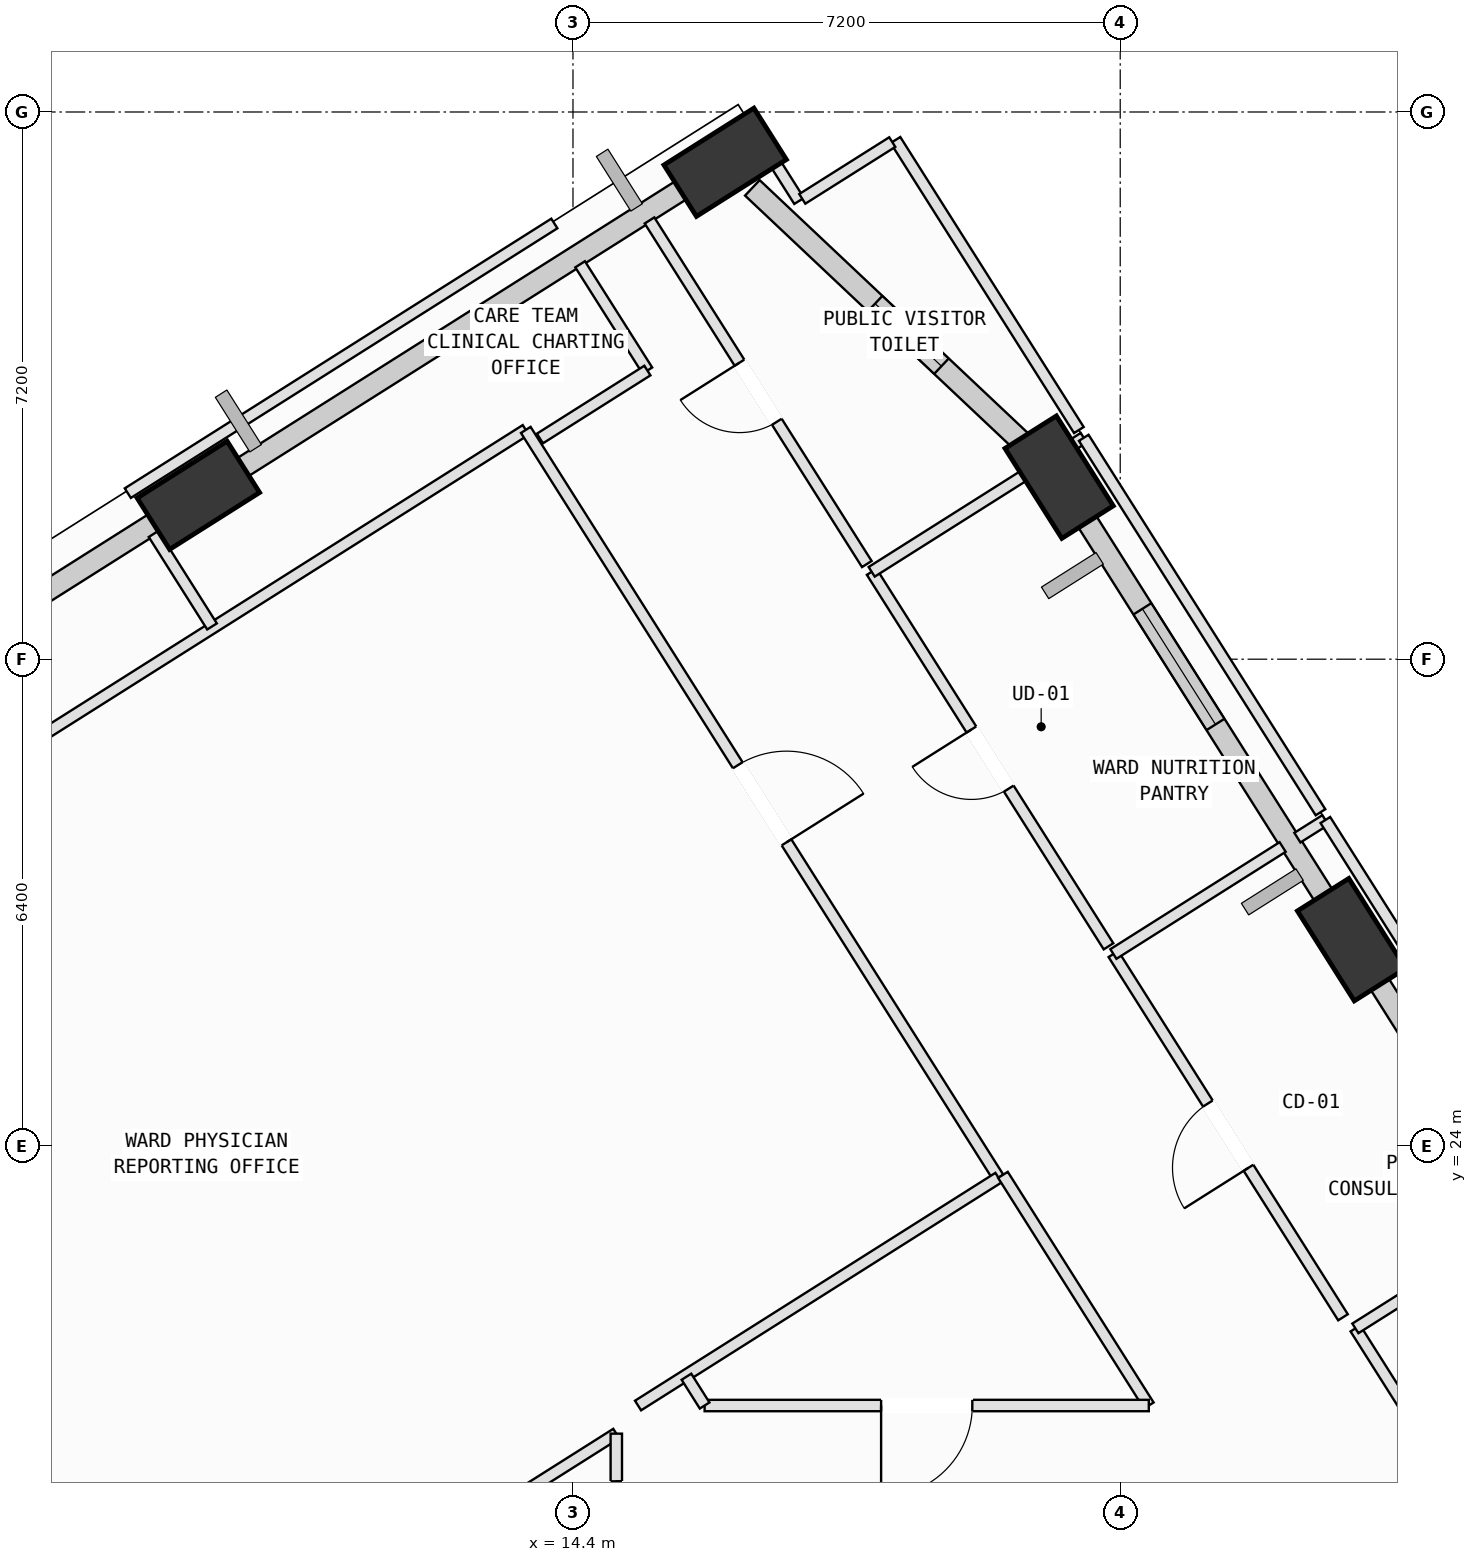
"""IFC4 building model, lengths in metres.
Left out: names, types, materials, properties, quantities, classifications, styles, units other than length and angle.
Written with IfcOpenShell. Run it as: python <this file> out.ifc"""

import sys

from ifc_helpers import new_model, si_unit, direction, frame, frame_2d, origin, origin_2d, place, context, subcontext, project, spatial, rectangle, extrude, element, fill, save


model = new_model("IFC4")
c1 = context("Model", 3, precision=1e-05, world=origin(), true_north=direction((0.0, 1.0)))
c2 = subcontext(c1, "Body", "Model", "MODEL_VIEW")
j1 = project(units=[si_unit("LENGTHUNIT", "METRE"), si_unit("PLANEANGLEUNIT", "RADIAN")], contexts=[c1])
p1 = place(None, origin())
s1 = spatial("IfcSite", under=j1, at=p1, CompositionType="ELEMENT")
p2 = place(p1, origin())
s2 = spatial("IfcBuilding", under=s1, at=p2, CompositionType="ELEMENT")
p3 = place(p2, frame((0.0, 0.0, 161.8)))
s3 = spatial("IfcBuildingStorey", under=s2, at=p3, CompositionType="ELEMENT", Elevation=161.8)
p4 = place(p3, frame((24.644, 26.71, 0.002), z_axis=(-0.007569840548, -0.037177684627, 0.99927999944), x_axis=(-0.355084598959, 0.934283931075, 0.032069669727)))
e1 = element("IfcColumn", 1, at=p4, inside=s3, PredefinedType="COLUMN", context=c2, shape_type="SweptSolid", body=[
    extrude(rectangle(XDim=1.4, YDim=0.8, at=origin_2d()), origin(), (0.0, 0.0, 1.0), 3.999),
])
p5 = place(p3, frame((20.796, 32.795, 0.002), z_axis=(-0.032680886403, -0.053228384011, 0.998047443161), x_axis=(-0.013972747304, 0.998507590936, 0.05279538972)))
e2 = element("IfcColumn", 2, at=p5, inside=s3, PredefinedType="COLUMN", context=c2, shape_type="SweptSolid", body=[
    extrude(rectangle(XDim=1.4, YDim=0.8, at=origin_2d()), origin(), (0.0, 0.0, 1.0), 4.004),
])
p6 = place(p3, frame((16.402, 36.939, 0.002), z_axis=(-0.049539835521, -0.071449345089, 0.996213228071), x_axis=(0.997943557889, -0.044161717518, 0.046458561901)))
e3 = element("IfcColumn", 3, at=p6, inside=s3, PredefinedType="COLUMN", context=c2, shape_type="SweptSolid", body=[
    extrude(rectangle(XDim=1.4, YDim=0.8, at=origin_2d()), origin(), (0.0, 0.0, 1.0), 4.011),
])
p7 = place(p3, frame((9.471, 32.557, 0.002), z_axis=(-0.03110757171, -0.099702197609, 0.994530940079), x_axis=(0.965182566959, 0.255554230871, 0.055809027255)))
e4 = element("IfcColumn", 4, at=p7, inside=s3, PredefinedType="COLUMN", context=c2, shape_type="SweptSolid", body=[
    extrude(rectangle(XDim=1.4, YDim=0.8, at=origin_2d()), origin(), (0.0, 0.0, 1.0), 4.018),
])
p8 = place(p3, frame((28.549, 20.532, 0.0), z_axis=(0.0, 0.0, 1.0), x_axis=(-0.534367970057, 0.845251958044, 0.0)))
e5 = element("IfcWall", 5, at=p8, inside=s3, PredefinedType="SOLIDWALL", context=c2, shape_type="SweptSolid", body=[
    extrude(rectangle(XDim=6.76, YDim=0.28, at=frame_2d((3.38, 0.0))), origin(), (0.0, 0.0, 1.0), 3.165),
])
p9 = place(p3, frame((24.409, 27.081, 0.0), z_axis=(0.0, 0.0, 1.0), x_axis=(-0.534364923139, 0.845253884296, 0.0)))
e6 = element("IfcWall", 6, at=p9, inside=s3, PredefinedType="SOLIDWALL", context=c2, shape_type="SweptSolid", body=[
    extrude(rectangle(XDim=6.223, YDim=0.28, at=frame_2d((3.111, 0.0))), origin(), (0.0, 0.0, 1.0), 3.165),
])
p10 = place(p9, frame((2.911, 0.0, 0.75)))
e7 = element("IfcOpeningElement", 7, at=p10, cuts=e6, PredefinedType="OPENING", context=c2, shape_type="SweptSolid", body=[
    extrude(rectangle(XDim=1.8, YDim=2.05, at=frame_2d((0.9, 1.025))), frame((0.0, 0.15, 0.0), z_axis=(0.0, -1.0, 0.0), x_axis=(1.0, 0.0, 0.0)), (0.0, 0.0, 1.0), 0.3),
])
p11 = place(p3, frame((16.76, 36.602, 0.0), z_axis=(0.0, 0.0, 1.0), x_axis=(0.727536761249, -0.686068699936, 0.0)))
e8 = element("IfcWall", 8, at=p11, inside=s3, PredefinedType="SOLIDWALL", context=c2, shape_type="SweptSolid", body=[
    extrude(rectangle(XDim=5.093, YDim=0.28, at=frame_2d((2.546, 0.0))), origin(), (0.0, 0.0, 1.0), 3.165),
])
p12 = place(p11, frame((2.22, 0.0, 0.75)))
e9 = element("IfcOpeningElement", 9, at=p12, cuts=e8, PredefinedType="OPENING", context=c2, shape_type="SweptSolid", body=[
    extrude(rectangle(XDim=1.2, YDim=1.75, at=frame_2d((0.6, 0.875))), frame((0.0, 0.15, 0.0), z_axis=(0.0, -1.0, 0.0), x_axis=(1.0, 0.0, 0.0)), (0.0, 0.0, 1.0), 0.3),
])
p13 = place(p3, frame((9.74, 32.727, 0.0), z_axis=(0.0, 0.0, 1.0), x_axis=(0.845259360398, 0.534356260991, 0.0)))
e10 = element("IfcWall", 10, at=p13, inside=s3, PredefinedType="SOLIDWALL", context=c2, shape_type="SweptSolid", body=[
    extrude(rectangle(XDim=7.231, YDim=0.28, at=frame_2d((3.615, 0.0))), origin(), (0.0, 0.0, 1.0), 3.165),
])
p14 = place(p3, frame((2.788, 28.332, 0.0), z_axis=(0.0, 0.0, 1.0), x_axis=(0.845259004131, 0.534356824543, 0.0)))
e11 = element("IfcWall", 11, at=p14, inside=s3, PredefinedType="SOLIDWALL", context=c2, shape_type="SweptSolid", body=[
    extrude(rectangle(XDim=7.27, YDim=0.28, at=frame_2d((3.635, 0.0))), origin(), (0.0, 0.0, 1.0), 3.165),
])
p15 = place(p3, frame((7.249, 15.328, 0.0), z_axis=(0.0, 0.0, 1.0), x_axis=(0.845207448996, 0.534438367038, 0.0)))
e12 = element("IfcWall", 12, at=p15, inside=s3, PredefinedType="PARTITIONING", context=c2, shape_type="SweptSolid", body=[
    extrude(rectangle(XDim=9.135, YDim=0.15, at=frame_2d((4.567, 0.0))), origin(), (0.0, 0.0, 1.0), 3.78),
])
p16 = place(p3, frame((14.97, 20.21, 0.0), z_axis=(0.0, 0.0, 1.0), x_axis=(0.0, -1.0, 0.0)))
e13 = element("IfcWall", 13, at=p16, inside=s3, PredefinedType="PARTITIONING", context=c2, shape_type="SweptSolid", body=[
    extrude(rectangle(XDim=1.98, YDim=0.15, at=frame_2d((0.99, 0.0))), origin(), (0.0, 0.0, 1.0), 3.78),
])
p17 = place(p16, frame((0.627, 0.0, 0.0)))
e14 = element("IfcOpeningElement", 14, at=p17, cuts=e13, PredefinedType="OPENING", context=c2, shape_type="SweptSolid", body=[
    extrude(rectangle(XDim=0.86, YDim=2.06, at=frame_2d((0.43, 1.03))), frame((0.0, 0.085, 0.0), z_axis=(0.0, -1.0, 0.0), x_axis=(1.0, 0.0, 0.0)), (0.0, 0.0, 1.0), 0.17),
])
p18 = place(p3, frame((2.561, 26.326, 0.0), z_axis=(0.0, 0.0, 1.0), x_axis=(0.845284698624, 0.534316178187, 0.0)))
e15 = element("IfcWall", 15, at=p18, inside=s3, PredefinedType="PARTITIONING", context=c2, shape_type="SweptSolid", body=[
    extrude(rectangle(XDim=13.271, YDim=0.15, at=frame_2d((6.636, 0.0))), origin(), (0.0, 0.0, 1.0), 3.78),
])
p19 = place(p3, frame((13.779, 33.417, 0.0), z_axis=(0.0, 0.0, 1.0), x_axis=(0.534288889049, -0.84530194785, 0.0)))
e16 = element("IfcWall", 16, at=p19, inside=s3, PredefinedType="PARTITIONING", context=c2, shape_type="SweptSolid", body=[
    extrude(rectangle(XDim=11.64, YDim=0.15, at=frame_2d((5.82, 0.0))), origin(), (0.0, 0.0, 1.0), 3.78),
])
p20 = place(p19, frame((5.22, 0.0, 0.0)))
e17 = element("IfcOpeningElement", 17, at=p20, cuts=e16, PredefinedType="OPENING", context=c2, shape_type="SweptSolid", body=[
    extrude(rectangle(XDim=1.2, YDim=2.15, at=frame_2d((0.6, 1.075))), frame((0.0, 0.085, 0.0), z_axis=(0.0, -1.0, 0.0), x_axis=(1.0, 0.0, 0.0)), (0.0, 0.0, 1.0), 0.17),
])
p21 = place(p3, frame((19.998, 23.578, 0.0), z_axis=(0.0, 0.0, 1.0), x_axis=(-0.845256150615, -0.534361338279, 0.0)))
e18 = element("IfcWall", 18, at=p21, inside=s3, PredefinedType="PARTITIONING", context=c2, shape_type="SweptSolid", body=[
    extrude(rectangle(XDim=5.61, YDim=0.15, at=frame_2d((2.805, 0.0))), origin(), (0.0, 0.0, 1.0), 3.78),
])
p22 = place(p3, frame((25.336, 20.58, 0.0), z_axis=(0.0, 0.0, 1.0), x_axis=(-0.53450539879, 0.845165060012, 0.0)))
e19 = element("IfcWall", 19, at=p22, inside=s3, PredefinedType="PARTITIONING", context=c2, shape_type="SweptSolid", body=[
    extrude(rectangle(XDim=1.201, YDim=0.15, at=frame_2d((0.601, 0.0))), origin(), (0.0, 0.0, 1.0), 3.415),
])
p23 = place(p3, frame((24.694, 21.595, 0.0), z_axis=(0.0, 0.0, 1.0), x_axis=(0.845308645917, 0.534278291846, 0.0)))
e20 = element("IfcWall", 20, at=p23, inside=s3, PredefinedType="PARTITIONING", context=c2, shape_type="SweptSolid", body=[
    extrude(rectangle(XDim=2.575, YDim=0.15, at=frame_2d((1.288, 0.0))), origin(), (0.0, 0.0, 1.0), 3.78),
])
p24 = place(p3, frame((24.531, 21.741, 0.0), z_axis=(0.0, 0.0, 1.0), x_axis=(-0.534249623968, 0.845326764802, 0.0)))
e21 = element("IfcWall", 21, at=p24, inside=s3, PredefinedType="PARTITIONING", context=c2, shape_type="SweptSolid", body=[
    extrude(rectangle(XDim=5.655, YDim=0.15, at=frame_2d((2.827, 0.0))), origin(), (0.0, 0.0, 1.0), 3.78),
])
p25 = place(p24, frame((2.327, 0.0, 0.0)))
e22 = element("IfcOpeningElement", 22, at=p25, cuts=e21, PredefinedType="OPENING", context=c2, shape_type="SweptSolid", body=[
    extrude(rectangle(XDim=1.0, YDim=2.12, at=frame_2d((0.5, 1.06))), frame((0.0, 0.085, 0.0), z_axis=(0.0, -1.0, 0.0), x_axis=(1.0, 0.0, 0.0)), (0.0, 0.0, 1.0), 0.17),
])
p26 = place(p3, frame((21.51, 26.521, 0.0), z_axis=(0.0, 0.0, 1.0), x_axis=(0.845248817842, 0.53437293713, 0.0)))
e23 = element("IfcWall", 23, at=p26, inside=s3, PredefinedType="PARTITIONING", context=c2, shape_type="SweptSolid", body=[
    extrude(rectangle(XDim=2.635, YDim=0.15, at=frame_2d((1.317, 0.0))), origin(), (0.0, 0.0, 1.0), 3.78),
])
p27 = place(p3, frame((23.931, 28.052, 0.0), z_axis=(0.0, 0.0, 1.0), x_axis=(0.846101639655, 0.533021589969, 0.0)))
e24 = element("IfcWall", 24, at=p27, inside=s3, PredefinedType="PARTITIONING", context=c2, shape_type="SweptSolid", body=[
    extrude(rectangle(XDim=0.435, YDim=0.15, at=frame_2d((0.218, 0.0))), origin(), (0.0, 0.0, 1.0), 3.78),
])
p28 = place(p3, frame((24.299, 28.284, 0.0), z_axis=(0.0, 0.0, 1.0), x_axis=(0.534373014898, -0.845248768677, 0.0)))
e25 = element("IfcWall", 25, at=p28, inside=s3, PredefinedType="PARTITIONING", context=c2, shape_type="SweptSolid", body=[
    extrude(rectangle(XDim=5.655, YDim=0.15, at=frame_2d((2.828, 0.0))), origin(), (0.0, 0.0, 1.0), 3.78),
])
p29 = place(p3, frame((21.446, 26.622, 0.0), z_axis=(0.0, 0.0, 1.0), x_axis=(-0.534429314986, 0.845213172687, 0.0)))
e26 = element("IfcWall", 26, at=p29, inside=s3, PredefinedType="PARTITIONING", context=c2, shape_type="SweptSolid", body=[
    extrude(rectangle(XDim=5.831, YDim=0.15, at=frame_2d((2.915, 0.0))), origin(), (0.0, 0.0, 1.0), 3.78),
])
p30 = place(p29, frame((2.455, 0.0, 0.0)))
e27 = element("IfcOpeningElement", 27, at=p30, cuts=e26, PredefinedType="OPENING", context=c2, shape_type="SweptSolid", body=[
    extrude(rectangle(XDim=0.92, YDim=2.1, at=frame_2d((0.46, 1.05))), frame((0.0, 0.085, 0.0), z_axis=(0.0, -1.0, 0.0), x_axis=(1.0, 0.0, 0.0)), (0.0, 0.0, 1.0), 0.17),
])
p31 = place(p3, frame((18.33, 31.55, 0.0), z_axis=(0.0, 0.0, 1.0), x_axis=(0.845378143146, 0.534168320936, 0.0)))
e28 = element("IfcWall", 28, at=p31, inside=s3, PredefinedType="PARTITIONING", context=c2, shape_type="SweptSolid", body=[
    extrude(rectangle(XDim=3.3, YDim=0.15, at=frame_2d((1.65, 0.0))), origin(), (0.0, 0.0, 1.0), 3.78),
])
p32 = place(p3, frame((21.12, 33.313, 0.0), z_axis=(0.0, 0.0, 1.0), x_axis=(0.53438530718, -0.845240997272, 0.0)))
e29 = element("IfcWall", 29, at=p32, inside=s3, PredefinedType="PARTITIONING", context=c2, shape_type="SweptSolid", body=[
    extrude(rectangle(XDim=5.829, YDim=0.15, at=frame_2d((2.915, 0.0))), origin(), (0.0, 0.0, 1.0), 3.78),
])
p33 = place(p3, frame((18.643, 37.231, 0.0), z_axis=(0.0, 0.0, 1.0), x_axis=(0.534434415404, -0.845209947665, 0.0)))
e30 = element("IfcWall", 30, at=p33, inside=s3, PredefinedType="PARTITIONING", context=c2, shape_type="SweptSolid", body=[
    extrude(rectangle(XDim=4.515, YDim=0.15, at=frame_2d((2.257, 0.0))), origin(), (0.0, 0.0, 1.0), 3.78),
])
p34 = place(p3, frame((18.266, 31.652, 0.0), z_axis=(0.0, 0.0, 1.0), x_axis=(-0.534496026991, 0.84517098692, 0.0)))
e31 = element("IfcWall", 31, at=p34, inside=s3, PredefinedType="PARTITIONING", context=c2, shape_type="SweptSolid", body=[
    extrude(rectangle(XDim=5.349, YDim=0.15, at=frame_2d((2.675, 0.0))), origin(), (0.0, 0.0, 1.0), 3.78),
])
p35 = place(p34, frame((2.215, 0.0, 0.0)))
e32 = element("IfcOpeningElement", 32, at=p35, cuts=e31, PredefinedType="OPENING", context=c2, shape_type="SweptSolid", body=[
    extrude(rectangle(XDim=0.92, YDim=2.1, at=frame_2d((0.46, 1.05))), frame((0.0, 0.085, 0.0), z_axis=(0.0, -1.0, 0.0), x_axis=(1.0, 0.0, 0.0)), (0.0, 0.0, 1.0), 0.17),
])
p36 = place(p3, frame((15.75, 36.751, 0.0), z_axis=(0.0, 0.0, 1.0), x_axis=(0.845363390997, 0.534191667065, 0.0)))
e33 = element("IfcWall", 33, at=p36, inside=s3, PredefinedType="PARTITIONING", context=c2, shape_type="SweptSolid", body=[
    extrude(rectangle(XDim=1.202, YDim=0.15, at=frame_2d((0.601, 0.0))), origin(), (0.0, 0.0, 1.0), 3.165),
])
p37 = place(p3, frame((16.793, 37.351, 0.0), z_axis=(0.0, 0.0, 1.0), x_axis=(0.534161581177, -0.845382401754, 0.0)))
e34 = element("IfcWall", 34, at=p37, inside=s3, PredefinedType="PARTITIONING", context=c2, shape_type="SweptSolid", body=[
    extrude(rectangle(XDim=1.09, YDim=0.15, at=frame_2d((0.545, 0.0))), origin(), (0.0, 0.0, 1.0), 3.78),
])
p38 = place(p3, frame((17.417, 36.457, 0.0), z_axis=(0.0, 0.0, 1.0), x_axis=(0.845737430746, 0.533599286202, 0.0)))
e35 = element("IfcWall", 35, at=p38, inside=s3, PredefinedType="PARTITIONING", context=c2, shape_type="SweptSolid", body=[
    extrude(rectangle(XDim=1.4, YDim=0.15, at=frame_2d((0.7, 0.0))), origin(), (0.0, 0.0, 1.0), 3.78),
])
p39 = place(p3, frame((20.057, 23.615, 0.0), z_axis=(0.0, 0.0, 1.0), x_axis=(0.534471261003, -0.845186648712, 0.0)))
e36 = element("IfcWall", 36, at=p39, inside=s3, PredefinedType="PARTITIONING", context=c2, shape_type="SweptSolid", body=[
    extrude(rectangle(XDim=3.591, YDim=0.15, at=frame_2d((1.795, 0.0))), origin(), (0.0, 0.0, 1.0), 3.78),
])
p40 = place(p3, frame((21.976, 20.58, 0.0), z_axis=(0.0, 0.0, 1.0), x_axis=(-1.0, 0.0, 0.0)))
e37 = element("IfcWall", 37, at=p40, inside=s3, PredefinedType="PARTITIONING", context=c2, shape_type="SweptSolid", body=[
    extrude(rectangle(XDim=5.844, YDim=0.15, at=frame_2d((2.922, 0.0))), origin(), (0.0, 0.0, 1.0), 3.78),
])
p41 = place(p40, frame((2.322, 0.0, 0.0)))
e38 = element("IfcOpeningElement", 38, at=p41, cuts=e37, PredefinedType="OPENING", context=c2, shape_type="SweptSolid", body=[
    extrude(rectangle(XDim=1.2, YDim=2.15, at=frame_2d((0.6, 1.075))), frame((0.0, 0.085, 0.0), z_axis=(0.0, -1.0, 0.0), x_axis=(1.0, 0.0, 0.0)), (0.0, 0.0, 1.0), 0.17),
])
p42 = place(p3, frame((16.132, 20.58, 0.0), z_axis=(0.0, 0.0, 1.0), x_axis=(-0.53352132423, 0.845786614101, 0.0)))
e39 = element("IfcWall", 39, at=p42, inside=s3, PredefinedType="PARTITIONING", context=c2, shape_type="SweptSolid", body=[
    extrude(rectangle(XDim=0.448, YDim=0.15, at=frame_2d((0.224, 0.0))), origin(), (0.0, 0.0, 1.0), 3.78),
])
p43 = place(p3, frame((9.651, 30.831, 0.0), z_axis=(0.0, 0.0, 1.0), x_axis=(-0.53406317949, 0.845444569628, 0.0)))
e40 = element("IfcWall", 40, at=p43, inside=s3, PredefinedType="PARTITIONING", context=c2, shape_type="SweptSolid", body=[
    extrude(rectangle(XDim=1.439, YDim=0.15, at=frame_2d((0.72, 0.0))), origin(), (0.0, 0.0, 1.0), 3.78),
])
p44 = place(p3, frame((8.543, 32.585, 0.0), z_axis=(0.0, 0.0, 1.0), x_axis=(0.845241540441, 0.534384448046, 0.0)))
e41 = element("IfcWall", 41, at=p44, inside=s3, PredefinedType="PARTITIONING", context=c2, shape_type="SweptSolid", body=[
    extrude(rectangle(XDim=6.64, YDim=0.15, at=frame_2d((3.32, 0.0))), origin(), (0.0, 0.0, 1.0), 3.78),
])
p45 = place(p3, frame((14.494, 35.596, 0.0), z_axis=(0.0, 0.0, 1.0), x_axis=(0.534897610299, -0.84491688733, 0.0)))
e42 = element("IfcWall", 42, at=p45, inside=s3, PredefinedType="PARTITIONING", context=c2, shape_type="SweptSolid", body=[
    extrude(rectangle(XDim=1.655, YDim=0.15, at=frame_2d((0.827, 0.0))), origin(), (0.0, 0.0, 1.0), 3.78),
])
p46 = place(p3, frame((15.379, 34.198, 0.0), z_axis=(0.0, 0.0, 1.0), x_axis=(-0.845190515026, -0.534465146956, 0.0)))
e43 = element("IfcWall", 43, at=p46, inside=s3, PredefinedType="PARTITIONING", context=c2, shape_type="SweptSolid", body=[
    extrude(rectangle(XDim=1.673, YDim=0.15, at=frame_2d((0.836, 0.0))), origin(), (0.0, 0.0, 1.0), 3.78),
])
p47 = place(p10, origin())
e44 = element("IfcWindow", 44, at=p47, inside=s3, PartitioningType="SINGLE_PANEL", PredefinedType="WINDOW", context=c2, shape_type="SweptSolid", body=[
    extrude(rectangle(XDim=1.8, YDim=2.05, at=frame_2d((0.9, 1.025))), frame((0.0, 0.03, 0.0), z_axis=(0.0, -1.0, 0.0), x_axis=(1.0, 0.0, 0.0)), (0.0, 0.0, 1.0), 0.06),
])
fill(e7, e44)
p48 = place(p12, origin())
e45 = element("IfcWindow", 45, at=p48, inside=s3, PartitioningType="SINGLE_PANEL", PredefinedType="WINDOW", context=c2, shape_type="SweptSolid", body=[
    extrude(rectangle(XDim=1.2, YDim=1.75, at=frame_2d((0.6, 0.875))), frame((0.0, 0.03, 0.0), z_axis=(0.0, -1.0, 0.0), x_axis=(1.0, 0.0, 0.0)), (0.0, 0.0, 1.0), 0.06),
])
fill(e9, e45)
p49 = place(p17, origin())
e46 = element("IfcDoor", 46, at=p49, inside=s3, OperationType="SLIDING_TO_LEFT", PredefinedType="DOOR", context=c2, shape_type="SweptSolid", body=[
    extrude(rectangle(XDim=0.86, YDim=2.06, at=frame_2d((0.43, 1.03))), frame((0.0, 0.025, 0.0), z_axis=(0.0, -1.0, 0.0), x_axis=(1.0, 0.0, 0.0)), (0.0, 0.0, 1.0), 0.05),
])
fill(e14, e46)
p50 = place(p20, origin())
e47 = element("IfcDoor", 47, at=p50, inside=s3, OperationType="SINGLE_SWING_RIGHT", PredefinedType="DOOR", context=c2, shape_type="SweptSolid", body=[
    extrude(rectangle(XDim=1.2, YDim=2.15, at=frame_2d((0.6, 1.075))), frame((0.0, 0.025, 0.0), z_axis=(0.0, -1.0, 0.0), x_axis=(1.0, 0.0, 0.0)), (0.0, 0.0, 1.0), 0.05),
])
fill(e17, e47)
p51 = place(p25, origin())
e48 = element("IfcDoor", 48, at=p51, inside=s3, OperationType="SINGLE_SWING_LEFT", PredefinedType="DOOR", context=c2, shape_type="SweptSolid", body=[
    extrude(rectangle(XDim=1.0, YDim=2.12, at=frame_2d((0.5, 1.06))), frame((0.0, 0.025, 0.0), z_axis=(0.0, -1.0, 0.0), x_axis=(1.0, 0.0, 0.0)), (0.0, 0.0, 1.0), 0.05),
])
fill(e22, e48)
p52 = place(p30, origin())
e49 = element("IfcDoor", 49, at=p52, inside=s3, OperationType="SINGLE_SWING_RIGHT", PredefinedType="DOOR", context=c2, shape_type="SweptSolid", body=[
    extrude(rectangle(XDim=0.92, YDim=2.1, at=frame_2d((0.46, 1.05))), frame((0.0, 0.025, 0.0), z_axis=(0.0, -1.0, 0.0), x_axis=(1.0, 0.0, 0.0)), (0.0, 0.0, 1.0), 0.05),
])
fill(e27, e49)
p53 = place(p35, origin())
e50 = element("IfcDoor", 50, at=p53, inside=s3, OperationType="SINGLE_SWING_RIGHT", PredefinedType="DOOR", context=c2, shape_type="SweptSolid", body=[
    extrude(rectangle(XDim=0.92, YDim=2.1, at=frame_2d((0.46, 1.05))), frame((0.0, 0.025, 0.0), z_axis=(0.0, -1.0, 0.0), x_axis=(1.0, 0.0, 0.0)), (0.0, 0.0, 1.0), 0.05),
])
fill(e32, e50)
p54 = place(p41, origin())
e51 = element("IfcDoor", 51, at=p54, inside=s3, OperationType="SINGLE_SWING_RIGHT", PredefinedType="DOOR", context=c2, shape_type="SweptSolid", body=[
    extrude(rectangle(XDim=1.2, YDim=2.15, at=frame_2d((0.6, 1.075))), frame((0.0, 0.025, 0.0), z_axis=(0.0, -1.0, 0.0), x_axis=(1.0, 0.0, 0.0)), (0.0, 0.0, 1.0), 0.05),
])
fill(e38, e51)
save(model, sys.argv[1])
